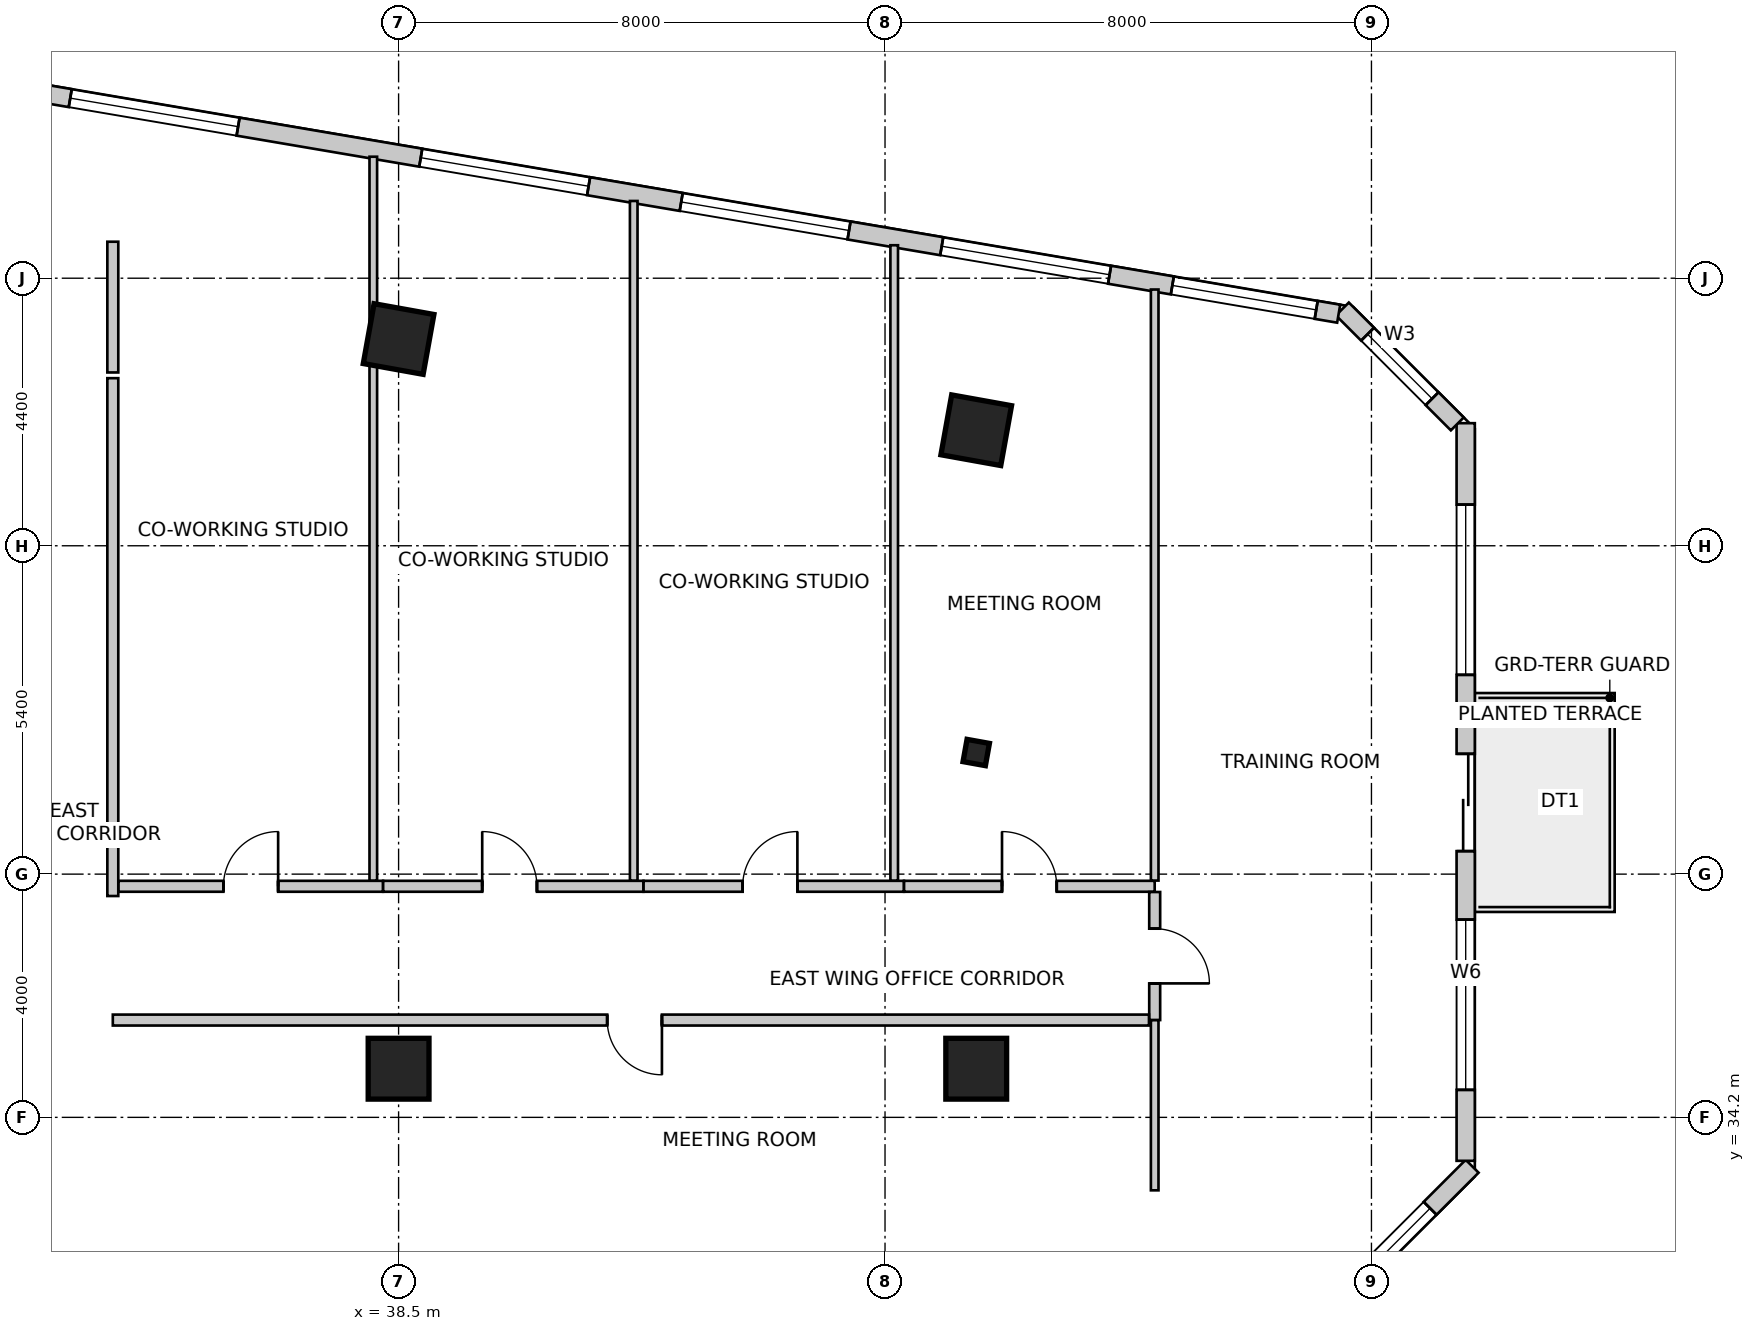
"""IFC4 building model, lengths in metres.
Left out: names, types, materials, properties, quantities, classifications, styles, units other than length and angle.
Written with IfcOpenShell. Run it as: python <this file> out.ifc"""

import sys

from ifc_helpers import new_model, si_unit, direction, frame, frame_2d, origin, origin_2d, place, context, subcontext, project, spatial, rectangle, i_section, extrude, source, transform, mapped, element, fill, save


model = new_model("IFC4")
c1 = context("Model", 3, precision=1e-05, world=origin(), true_north=direction((0.0, 1.0)))
c2 = subcontext(c1, "Body", "Model", "MODEL_VIEW")
j1 = project(units=[si_unit("LENGTHUNIT", "METRE"), si_unit("PLANEANGLEUNIT", "RADIAN")], contexts=[c1])
p1 = place(None, origin())
s1 = spatial("IfcSite", under=j1, at=p1, CompositionType="ELEMENT")
p2 = place(p1, origin())
s2 = spatial("IfcBuilding", under=s1, at=p2, CompositionType="ELEMENT")
p3 = place(p2, frame((0.0, 0.0, 75.0)))
s3 = spatial("IfcBuildingStorey", under=s2, at=p3, CompositionType="ELEMENT", Elevation=75.0)
m1 = source(origin(), c2, "Body", "SweptSolid", [
    extrude(rectangle(XDim=1.0, YDim=1.0, at=origin_2d()), origin(), (0.0, 0.0, 1.0), 4.0),
])
for number, where, z_axis, x_axis in (
    (1, (38.5, 47.0, 0.0), (0.0, 0.0, 1.0), (0.984, -0.177, 0.0)),
    (2, (48.0, 45.5, 0.0), (0.0, 0.0, 1.0), (0.984, -0.177, 0.0)),
    (3, (38.5, 35.0, 0.0), (0.0, 0.0, 1.0), (1.0, 0.0, 0.0)),
    (4, (48.0, 35.0, 0.0), (0.0, 0.0, 1.0), (1.0, 0.0, 0.0)),
):
    element("IfcColumn", number, at=place(p3, frame(where, z_axis=z_axis, x_axis=x_axis)), inside=s3, PredefinedType="COLUMN", context=c2, shape_type="MappedRepresentation", body=[
        mapped(m1, transform((0.0, 0.0, 0.0), scale=1.0)),
    ])
m2 = source(origin(), c2, "Body", "SweptSolid", [
    extrude(i_section(OverallWidth=0.374, OverallDepth=0.372, WebThickness=0.016, FlangeThickness=0.026, FilletRadius=0.015, at=origin_2d()), origin(), (0.0, 0.0, 1.0), 4.0),
])
p4 = place(p3, frame((48.0, 40.2, 0.0), z_axis=(0.0, 0.0, 1.0), x_axis=(0.984195607969, -0.17708474032, 0.0)))
e5 = element("IfcColumn", 5, at=p4, inside=s3, PredefinedType="COLUMN", context=c2, shape_type="MappedRepresentation", body=[
    mapped(m2, transform((0.0, 0.0, 0.0), scale=1.0)),
])
p5 = place(p3, frame((53.076, 30.316, 0.0), z_axis=(0.0, 0.0, 1.0), x_axis=(0.707078757535, 0.707134803727, 0.0)))
e6 = element("IfcWall", 6, at=p5, inside=s3, PredefinedType="SOLIDWALL", context=c2, shape_type="SweptSolid", body=[
    extrude(rectangle(XDim=4.356, YDim=0.3, at=frame_2d((2.178, 0.0))), origin(), (0.0, 0.0, 1.0), 3.75),
])
m3 = source(origin(), c2, "Body", "SweptSolid", [
    extrude(rectangle(XDim=2.4, YDim=2.2, at=frame_2d((1.2, 1.1))), frame((0.0, 0.16, 0.0), z_axis=(0.0, -1.0, 0.0), x_axis=(1.0, 0.0, 0.0)), (0.0, 0.0, 1.0), 0.32),
])
p6 = place(p5, frame((0.978, 0.0, 0.85)))
e7 = element("IfcOpeningElement", 7, at=p6, cuts=e6, PredefinedType="OPENING", context=c2, shape_type="MappedRepresentation", body=[
    mapped(m3, transform((0.0, 0.0, 0.0), scale=1.0)),
])
p7 = place(p3, frame((56.05, 33.485, 0.0), z_axis=(0.0, 0.0, 1.0), x_axis=(0.0, 1.0, 0.0)))
e8 = element("IfcWall", 8, at=p7, inside=s3, PredefinedType="SOLIDWALL", context=c2, shape_type="SweptSolid", body=[
    extrude(rectangle(XDim=12.131, YDim=0.3, at=frame_2d((6.065, 0.0))), origin(), (0.0, 0.0, 1.0), 3.75),
])
m4 = source(origin(), c2, "Body", "SweptSolid", [
    extrude(rectangle(XDim=1.6, YDim=2.15, at=frame_2d((0.8, 1.075))), frame((0.0, 0.16, 0.0), z_axis=(0.0, -1.0, 0.0), x_axis=(1.0, 0.0, 0.0)), (0.0, 0.0, 1.0), 0.32),
])
p8 = place(p7, frame((5.093, 0.0, 0.0)))
e9 = element("IfcOpeningElement", 9, at=p8, cuts=e8, PredefinedType="OPENING", context=c2, shape_type="MappedRepresentation", body=[
    mapped(m4, transform((0.0, 0.0, 0.0), scale=1.0)),
])
m5 = source(origin(), c2, "Body", "SweptSolid", [
    extrude(rectangle(XDim=2.8, YDim=2.4, at=frame_2d((1.4, 1.2))), frame((0.0, 0.16, 0.0), z_axis=(0.0, -1.0, 0.0), x_axis=(1.0, 0.0, 0.0)), (0.0, 0.0, 1.0), 0.32),
])
p9 = place(p7, frame((1.167, 0.0, 0.85)))
e10 = element("IfcOpeningElement", 10, at=p9, cuts=e8, PredefinedType="OPENING", context=c2, shape_type="MappedRepresentation", body=[
    mapped(m5, transform((0.0, 0.0, 0.0), scale=1.0)),
])
p10 = place(p7, frame((7.992, 0.0, 0.85)))
e11 = element("IfcOpeningElement", 11, at=p10, cuts=e8, PredefinedType="OPENING", context=c2, shape_type="MappedRepresentation", body=[
    mapped(m5, transform((0.0, 0.0, 0.0), scale=1.0)),
])
p11 = place(p3, frame((55.912, 45.604, 0.0), z_axis=(0.0, 0.0, 1.0), x_axis=(-0.707152443695, 0.707061115729, 0.0)))
e12 = element("IfcWall", 12, at=p11, inside=s3, PredefinedType="SOLIDWALL", context=c2, shape_type="SweptSolid", body=[
    extrude(rectangle(XDim=2.673, YDim=0.3, at=frame_2d((1.337, 0.0))), origin(), (0.0, 0.0, 1.0), 3.75),
])
m6 = source(origin(), c2, "Body", "SweptSolid", [
    extrude(rectangle(XDim=1.5, YDim=1.8, at=frame_2d((0.75, 0.9))), frame((0.0, 0.16, 0.0), z_axis=(0.0, -1.0, 0.0), x_axis=(1.0, 0.0, 0.0)), (0.0, 0.0, 1.0), 0.32),
])
p12 = place(p11, frame((0.587, 0.0, 0.85)))
e13 = element("IfcOpeningElement", 13, at=p12, cuts=e12, PredefinedType="OPENING", context=c2, shape_type="MappedRepresentation", body=[
    mapped(m6, transform((0.0, 0.0, 0.0), scale=1.0)),
])
p13 = place(p3, frame((53.961, 47.417, 0.0), z_axis=(0.0, 0.0, 1.0), x_axis=(-0.985865713455, 0.167537443678, 0.0)))
e14 = element("IfcWall", 14, at=p13, inside=s3, PredefinedType="SOLIDWALL", context=c2, shape_type="SweptSolid", body=[
    extrude(rectangle(XDim=32.537, YDim=0.3, at=frame_2d((16.269, 0.0))), origin(), (0.0, 0.0, 1.0), 3.75),
])
p14 = place(p13, frame((0.375, 0.0, 0.85)))
e15 = element("IfcOpeningElement", 15, at=p14, cuts=e14, PredefinedType="OPENING", context=c2, shape_type="MappedRepresentation", body=[
    mapped(m3, transform((0.0, 0.0, 0.0), scale=1.0)),
])
p15 = place(p13, frame((3.822, 0.0, 0.85)))
e16 = element("IfcOpeningElement", 16, at=p15, cuts=e14, PredefinedType="OPENING", context=c2, shape_type="MappedRepresentation", body=[
    mapped(m5, transform((0.0, 0.0, 0.0), scale=1.0)),
])
p16 = place(p13, frame((8.168, 0.0, 0.85)))
e17 = element("IfcOpeningElement", 17, at=p16, cuts=e14, PredefinedType="OPENING", context=c2, shape_type="MappedRepresentation", body=[
    mapped(m5, transform((0.0, 0.0, 0.0), scale=1.0)),
])
p17 = place(p13, frame((12.513, 0.0, 0.85)))
e18 = element("IfcOpeningElement", 18, at=p17, cuts=e14, PredefinedType="OPENING", context=c2, shape_type="MappedRepresentation", body=[
    mapped(m5, transform((0.0, 0.0, 0.0), scale=1.0)),
])
p18 = place(p13, frame((18.36, 0.0, 0.85)))
e19 = element("IfcOpeningElement", 19, at=p18, cuts=e14, PredefinedType="OPENING", context=c2, shape_type="MappedRepresentation", body=[
    mapped(m5, transform((0.0, 0.0, 0.0), scale=1.0)),
])
p19 = place(p13, frame((24.895, 0.0, 0.85)))
e20 = element("IfcOpeningElement", 20, at=p19, cuts=e14, PredefinedType="OPENING", context=c2, shape_type="MappedRepresentation", body=[
    mapped(m5, transform((0.0, 0.0, 0.0), scale=1.0)),
])
p20 = place(p13, frame((29.395, 0.0, 0.85)))
e21 = element("IfcOpeningElement", 21, at=p20, cuts=e14, PredefinedType="OPENING", context=c2, shape_type="MappedRepresentation", body=[
    mapped(m5, transform((0.0, 0.0, 0.0), scale=1.0)),
])
p21 = place(p3, frame((33.8, 48.6, 0.0), z_axis=(0.0, 0.0, 1.0), x_axis=(0.0, -1.0, 0.0)))
e22 = element("IfcWall", 22, at=p21, inside=s3, PredefinedType="PARTITIONING", context=c2, shape_type="SweptSolid", body=[
    extrude(rectangle(XDim=2.15, YDim=0.18, at=frame_2d((1.075, 0.0))), origin(), (0.0, 0.0, 1.0), 2.892),
])
p22 = place(p3, frame((33.8, 46.356, 0.0), z_axis=(0.0, 0.0, 1.0), x_axis=(0.0, -1.0, 0.0)))
e23 = element("IfcWall", 23, at=p22, inside=s3, PredefinedType="PARTITIONING", context=c2, shape_type="SweptSolid", body=[
    extrude(rectangle(XDim=8.516, YDim=0.18, at=frame_2d((4.258, 0.0))), origin(), (0.0, 0.0, 1.0), 3.188),
])
p23 = place(p3, frame((33.894, 38.0, 0.0), z_axis=(0.0, 0.0, 1.0), x_axis=(1.0, 0.0, 0.0)))
e24 = element("IfcWall", 24, at=p23, inside=s3, PredefinedType="PARTITIONING", context=c2, shape_type="SweptSolid", body=[
    extrude(rectangle(XDim=4.35, YDim=0.18, at=frame_2d((2.175, 0.0))), origin(), (0.0, 0.0, 1.0), 3.335),
])
m7 = source(origin(), c2, "Body", "SweptSolid", [
    extrude(rectangle(XDim=0.9, YDim=2.15, at=frame_2d((0.45, 1.075))), frame((0.0, 0.1, 0.0), z_axis=(0.0, -1.0, 0.0), x_axis=(1.0, 0.0, 0.0)), (0.0, 0.0, 1.0), 0.2),
])
p24 = place(p23, frame((1.725, 0.0, 0.0)))
e25 = element("IfcOpeningElement", 25, at=p24, cuts=e24, PredefinedType="OPENING", context=c2, shape_type="MappedRepresentation", body=[
    mapped(m7, transform((0.0, 0.0, 0.0), scale=1.0)),
])
p25 = place(p3, frame((38.246, 38.0, 0.0), z_axis=(0.0, 0.0, 1.0), x_axis=(1.0, 0.0, 0.0)))
e26 = element("IfcWall", 26, at=p25, inside=s3, PredefinedType="PARTITIONING", context=c2, shape_type="SweptSolid", body=[
    extrude(rectangle(XDim=4.281, YDim=0.18, at=frame_2d((2.141, 0.0))), origin(), (0.0, 0.0, 1.0), 3.125),
])
p26 = place(p25, frame((1.629, 0.0, 0.0)))
e27 = element("IfcOpeningElement", 27, at=p26, cuts=e26, PredefinedType="OPENING", context=c2, shape_type="MappedRepresentation", body=[
    mapped(m7, transform((0.0, 0.0, 0.0), scale=1.0)),
])
p27 = place(p3, frame((42.529, 38.0, 0.0), z_axis=(0.0, 0.0, 1.0), x_axis=(1.0, 0.0, 0.0)))
e28 = element("IfcWall", 28, at=p27, inside=s3, PredefinedType="PARTITIONING", context=c2, shape_type="SweptSolid", body=[
    extrude(rectangle(XDim=4.282, YDim=0.18, at=frame_2d((2.141, 0.0))), origin(), (0.0, 0.0, 1.0), 3.188),
])
p28 = place(p27, frame((1.63, 0.0, 0.0)))
e29 = element("IfcOpeningElement", 29, at=p28, cuts=e28, PredefinedType="OPENING", context=c2, shape_type="MappedRepresentation", body=[
    mapped(m7, transform((0.0, 0.0, 0.0), scale=1.0)),
])
p29 = place(p3, frame((46.813, 38.0, 0.0), z_axis=(0.0, 0.0, 1.0), x_axis=(1.0, 0.0, 0.0)))
e30 = element("IfcWall", 30, at=p29, inside=s3, PredefinedType="PARTITIONING", context=c2, shape_type="SweptSolid", body=[
    extrude(rectangle(XDim=4.122, YDim=0.18, at=frame_2d((2.061, 0.0))), origin(), (0.0, 0.0, 1.0), 3.125),
])
p30 = place(p29, frame((1.611, 0.0, 0.0)))
e31 = element("IfcOpeningElement", 31, at=p30, cuts=e30, PredefinedType="OPENING", context=c2, shape_type="MappedRepresentation", body=[
    mapped(m7, transform((0.0, 0.0, 0.0), scale=1.0)),
])
p31 = place(p3, frame((50.935, 37.906, 0.0), z_axis=(0.0, 0.0, 1.0), x_axis=(0.0, -1.0, 0.0)))
e32 = element("IfcWall", 32, at=p31, inside=s3, PredefinedType="PARTITIONING", context=c2, shape_type="SweptSolid", body=[
    extrude(rectangle(XDim=2.106, YDim=0.18, at=frame_2d((1.053, 0.0))), origin(), (0.0, 0.0, 1.0), 3.75),
])
p32 = place(p31, frame((0.603, 0.0, 0.0)))
e33 = element("IfcOpeningElement", 33, at=p32, cuts=e32, PredefinedType="OPENING", context=c2, shape_type="MappedRepresentation", body=[
    mapped(m7, transform((0.0, 0.0, 0.0), scale=1.0)),
])
p33 = place(p3, frame((50.841, 35.8, 0.0), z_axis=(0.0, 0.0, 1.0), x_axis=(-1.0, 0.0, 0.0)))
e34 = element("IfcWall", 34, at=p33, inside=s3, PredefinedType="PARTITIONING", context=c2, shape_type="SweptSolid", body=[
    extrude(rectangle(XDim=17.041, YDim=0.18, at=frame_2d((8.521, 0.0))), origin(), (0.0, 0.0, 1.0), 3.125),
])
p34 = place(p33, frame((8.01, 0.0, 0.0)))
e35 = element("IfcOpeningElement", 35, at=p34, cuts=e34, PredefinedType="OPENING", context=c2, shape_type="MappedRepresentation", body=[
    mapped(m7, transform((0.0, 0.0, 0.0), scale=1.0)),
])
p35 = place(p3, frame((38.084, 49.998, 0.0), z_axis=(0.0, 0.0, 1.0), x_axis=(0.0, -1.0, 0.0)))
e36 = element("IfcWall", 36, at=p35, inside=s3, PredefinedType="PARTITIONING", context=c2, shape_type="SweptSolid", body=[
    extrude(rectangle(XDim=11.904, YDim=0.125, at=frame_2d((5.952, 0.0))), origin(), (0.0, 0.0, 1.0), 2.892),
])
p36 = place(p3, frame((42.367, 49.27, 0.0), z_axis=(0.0, 0.0, 1.0), x_axis=(0.0, -1.0, 0.0)))
e37 = element("IfcWall", 37, at=p36, inside=s3, PredefinedType="PARTITIONING", context=c2, shape_type="SweptSolid", body=[
    extrude(rectangle(XDim=11.176, YDim=0.125, at=frame_2d((5.588, 0.0))), origin(), (0.0, 0.0, 1.0), 2.892),
])
p37 = place(p3, frame((46.651, 48.542, 0.0), z_axis=(0.0, 0.0, 1.0), x_axis=(0.0, -1.0, 0.0)))
e38 = element("IfcWall", 38, at=p37, inside=s3, PredefinedType="PARTITIONING", context=c2, shape_type="SweptSolid", body=[
    extrude(rectangle(XDim=10.448, YDim=0.125, at=frame_2d((5.224, 0.0))), origin(), (0.0, 0.0, 1.0), 2.892),
])
p38 = place(p3, frame((50.935, 47.814, 0.0), z_axis=(0.0, 0.0, 1.0), x_axis=(0.0, -1.0, 0.0)))
e39 = element("IfcWall", 39, at=p38, inside=s3, PredefinedType="PARTITIONING", context=c2, shape_type="SweptSolid", body=[
    extrude(rectangle(XDim=9.72, YDim=0.125, at=frame_2d((4.86, 0.0))), origin(), (0.0, 0.0, 1.0), 3.75),
])
p39 = place(p3, frame((50.935, 33.0, 0.0), z_axis=(0.0, 0.0, 1.0), x_axis=(0.0, 1.0, 0.0)))
e40 = element("IfcWall", 40, at=p39, inside=s3, PredefinedType="PARTITIONING", context=c2, shape_type="SweptSolid", body=[
    extrude(rectangle(XDim=2.798, YDim=0.125, at=frame_2d((1.399, 0.0))), origin(), (0.0, 0.0, 1.0), 3.75),
])
m8 = source(origin(), c2, "Body", "SweptSolid", [
    extrude(rectangle(XDim=2.4, YDim=2.2, at=frame_2d((1.2, 1.1))), frame((0.0, -0.015, 0.0), z_axis=(0.0, -1.0, 0.0), x_axis=(1.0, 0.0, 0.0)), (0.0, 0.0, 1.0), 0.06),
])
p40 = place(p6, origin())
e41 = element("IfcWindow", 41, at=p40, inside=s3, PartitioningType="SINGLE_PANEL", PredefinedType="WINDOW", context=c2, shape_type="MappedRepresentation", body=[
    mapped(m8, transform((0.0, 0.0, 0.0), scale=1.0)),
])
fill(e7, e41)
m9 = source(origin(), c2, "Body", "SweptSolid", [
    extrude(rectangle(XDim=1.6, YDim=2.15, at=frame_2d((0.8, 1.075))), frame((0.0, 0.025, 0.0), z_axis=(0.0, -1.0, 0.0), x_axis=(1.0, 0.0, 0.0)), (0.0, 0.0, 1.0), 0.05),
])
p41 = place(p8, origin())
e42 = element("IfcDoor", 42, at=p41, inside=s3, OperationType="DOUBLE_DOOR_SLIDING", PredefinedType="DOOR", context=c2, shape_type="MappedRepresentation", body=[
    mapped(m9, transform((0.0, 0.0, 0.0), scale=1.0)),
])
fill(e9, e42)
m10 = source(origin(), c2, "Body", "SweptSolid", [
    extrude(rectangle(XDim=2.8, YDim=2.4, at=frame_2d((1.4, 1.2))), frame((0.0, -0.015, 0.0), z_axis=(0.0, -1.0, 0.0), x_axis=(1.0, 0.0, 0.0)), (0.0, 0.0, 1.0), 0.06),
])
p42 = place(p9, origin())
e43 = element("IfcWindow", 43, at=p42, inside=s3, PartitioningType="SINGLE_PANEL", PredefinedType="WINDOW", context=c2, shape_type="MappedRepresentation", body=[
    mapped(m10, transform((0.0, 0.0, 0.0), scale=1.0)),
])
fill(e10, e43)
p43 = place(p10, origin())
e44 = element("IfcWindow", 44, at=p43, inside=s3, PartitioningType="SINGLE_PANEL", PredefinedType="WINDOW", context=c2, shape_type="MappedRepresentation", body=[
    mapped(m10, transform((0.0, 0.0, 0.0), scale=1.0)),
])
fill(e11, e44)
m11 = source(origin(), c2, "Body", "SweptSolid", [
    extrude(rectangle(XDim=1.5, YDim=1.8, at=frame_2d((0.75, 0.9))), frame((0.0, -0.015, 0.0), z_axis=(0.0, -1.0, 0.0), x_axis=(1.0, 0.0, 0.0)), (0.0, 0.0, 1.0), 0.06),
])
p44 = place(p12, origin())
e45 = element("IfcWindow", 45, at=p44, inside=s3, PartitioningType="SINGLE_PANEL", PredefinedType="WINDOW", context=c2, shape_type="MappedRepresentation", body=[
    mapped(m11, transform((0.0, 0.0, 0.0), scale=1.0)),
])
fill(e13, e45)
p45 = place(p14, origin())
e46 = element("IfcWindow", 46, at=p45, inside=s3, PartitioningType="SINGLE_PANEL", PredefinedType="WINDOW", context=c2, shape_type="MappedRepresentation", body=[
    mapped(m8, transform((0.0, 0.0, 0.0), scale=1.0)),
])
fill(e15, e46)
p46 = place(p15, origin())
e47 = element("IfcWindow", 47, at=p46, inside=s3, PartitioningType="SINGLE_PANEL", PredefinedType="WINDOW", context=c2, shape_type="MappedRepresentation", body=[
    mapped(m10, transform((0.0, 0.0, 0.0), scale=1.0)),
])
fill(e16, e47)
p47 = place(p16, origin())
e48 = element("IfcWindow", 48, at=p47, inside=s3, PartitioningType="SINGLE_PANEL", PredefinedType="WINDOW", context=c2, shape_type="MappedRepresentation", body=[
    mapped(m10, transform((0.0, 0.0, 0.0), scale=1.0)),
])
fill(e17, e48)
p48 = place(p17, origin())
e49 = element("IfcWindow", 49, at=p48, inside=s3, PartitioningType="SINGLE_PANEL", PredefinedType="WINDOW", context=c2, shape_type="MappedRepresentation", body=[
    mapped(m10, transform((0.0, 0.0, 0.0), scale=1.0)),
])
fill(e18, e49)
p49 = place(p18, origin())
e50 = element("IfcWindow", 50, at=p49, inside=s3, PartitioningType="SINGLE_PANEL", PredefinedType="WINDOW", context=c2, shape_type="MappedRepresentation", body=[
    mapped(m10, transform((0.0, 0.0, 0.0), scale=1.0)),
])
fill(e19, e50)
m12 = source(origin(), c2, "Body", "SweptSolid", [
    extrude(rectangle(XDim=0.9, YDim=2.15, at=frame_2d((0.45, 1.075))), frame((0.0, 0.025, 0.0), z_axis=(0.0, -1.0, 0.0), x_axis=(1.0, 0.0, 0.0)), (0.0, 0.0, 1.0), 0.05),
])
p50 = place(p24, origin())
e51 = element("IfcDoor", 51, at=p50, inside=s3, OperationType="SINGLE_SWING_RIGHT", PredefinedType="DOOR", context=c2, shape_type="MappedRepresentation", body=[
    mapped(m12, transform((0.0, 0.0, 0.0), scale=1.0)),
])
fill(e25, e51)
p51 = place(p26, origin())
e52 = element("IfcDoor", 52, at=p51, inside=s3, OperationType="SINGLE_SWING_LEFT", PredefinedType="DOOR", context=c2, shape_type="MappedRepresentation", body=[
    mapped(m12, transform((0.0, 0.0, 0.0), scale=1.0)),
])
fill(e27, e52)
p52 = place(p28, origin())
e53 = element("IfcDoor", 53, at=p52, inside=s3, OperationType="SINGLE_SWING_RIGHT", PredefinedType="DOOR", context=c2, shape_type="MappedRepresentation", body=[
    mapped(m12, transform((0.0, 0.0, 0.0), scale=1.0)),
])
fill(e29, e53)
p53 = place(p30, origin())
e54 = element("IfcDoor", 54, at=p53, inside=s3, OperationType="SINGLE_SWING_LEFT", PredefinedType="DOOR", context=c2, shape_type="MappedRepresentation", body=[
    mapped(m12, transform((0.0, 0.0, 0.0), scale=1.0)),
])
fill(e31, e54)
p54 = place(p32, origin())
e55 = element("IfcDoor", 55, at=p54, inside=s3, OperationType="SINGLE_SWING_RIGHT", PredefinedType="DOOR", context=c2, shape_type="MappedRepresentation", body=[
    mapped(m12, transform((0.0, 0.0, 0.0), scale=1.0)),
])
fill(e33, e55)
p55 = place(p34, origin())
e56 = element("IfcDoor", 56, at=p55, inside=s3, OperationType="SINGLE_SWING_LEFT", PredefinedType="DOOR", context=c2, shape_type="MappedRepresentation", body=[
    mapped(m12, transform((0.0, 0.0, 0.0), scale=1.0)),
])
fill(e35, e56)
save(model, sys.argv[1])
